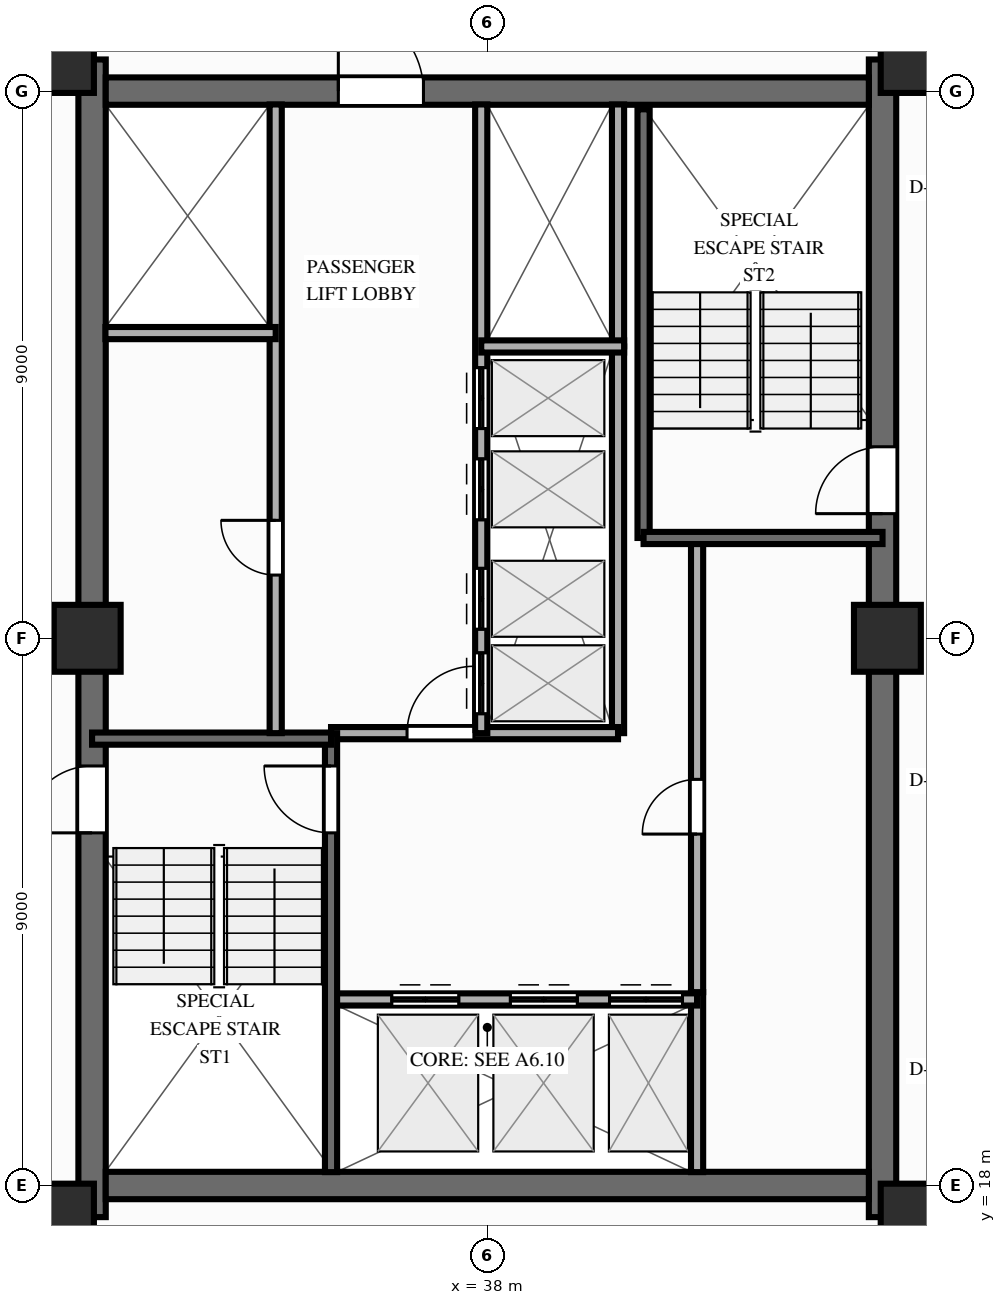
"""IFC4 building model, lengths in metres.
Left out: names, types, materials, properties, quantities, classifications, styles, units other than length and angle.
Written with IfcOpenShell. Run it as: python <this file> out.ifc"""

import sys

from ifc_helpers import new_model, si_unit, direction, frame, frame_2d, origin, origin_2d, place, context, subcontext, project, spatial, rectangle, extrude, source, transform, mapped, element, fill, save


model = new_model("IFC4")
c1 = context("Model", 3, precision=1e-05, world=origin(), true_north=direction((0.0, 1.0)))
c2 = subcontext(c1, "Body", "Model", "MODEL_VIEW")
j1 = project(units=[si_unit("LENGTHUNIT", "METRE"), si_unit("PLANEANGLEUNIT", "RADIAN")], contexts=[c1])
p1 = place(None, origin())
s1 = spatial("IfcSite", under=j1, at=p1, CompositionType="ELEMENT")
p2 = place(p1, origin())
s2 = spatial("IfcBuilding", under=s1, at=p2, CompositionType="ELEMENT")
p3 = place(p2, frame((0.0, 0.0, 166.0)))
s3 = spatial("IfcBuildingStorey", under=s2, at=p3, CompositionType="ELEMENT", Elevation=166.0)
p4 = place(p3, frame((31.5, 17.48, 0.0), z_axis=(0.0, 0.0, 1.0), x_axis=(0.0, 1.0, 0.0)))
e1 = element("IfcWall", 1, at=p4, inside=s3, PredefinedType="SHEAR", context=c2, shape_type="SweptSolid", body=[
    extrude(rectangle(XDim=19.04, YDim=0.45, at=frame_2d((9.52, 0.0))), origin(), (0.0, 0.0, 1.0), 3.0),
])
p5 = place(p4, frame((6.32, 0.0, 0.0)))
e2 = element("IfcOpeningElement", 2, at=p5, cuts=e1, PredefinedType="OPENING", context=c2, shape_type="SweptSolid", body=[
    extrude(rectangle(XDim=1.1, YDim=2.15, at=frame_2d((0.55, 1.075))), frame((0.0, 0.237, 0.0), z_axis=(0.0, -1.0, 0.0), x_axis=(1.0, 0.0, 0.0)), (0.0, 0.0, 1.0), 0.474),
])
p6 = place(p3, frame((44.5, 17.48, 0.0), z_axis=(0.0, 0.0, 1.0), x_axis=(0.0, 1.0, 0.0)))
e3 = element("IfcWall", 3, at=p6, inside=s3, PredefinedType="SHEAR", context=c2, shape_type="SweptSolid", body=[
    extrude(rectangle(XDim=19.04, YDim=0.45, at=frame_2d((9.52, 0.0))), origin(), (0.0, 0.0, 1.0), 3.0),
])
p7 = place(p6, frame((12.67, 0.0, 0.0), z_axis=(0.0, 0.0, 1.0), x_axis=(-1.0, 0.0, 0.0)))
e4 = element("IfcOpeningElement", 4, at=p7, cuts=e3, PredefinedType="OPENING", context=c2, shape_type="SweptSolid", body=[
    extrude(rectangle(XDim=1.1, YDim=2.15, at=frame_2d((0.55, 1.075))), frame((0.0, 0.237, 0.0), z_axis=(0.0, -1.0, 0.0), x_axis=(1.0, 0.0, 0.0)), (0.0, 0.0, 1.0), 0.474),
])
p8 = place(p3, frame((31.725, 18.0, 0.0), z_axis=(0.0, 0.0, 1.0), x_axis=(1.0, 0.0, 0.0)))
e5 = element("IfcWall", 5, at=p8, inside=s3, PredefinedType="SHEAR", context=c2, shape_type="SweptSolid", body=[
    extrude(rectangle(XDim=12.55, YDim=0.45, at=frame_2d((6.275, 0.0))), origin(), (0.0, 0.0, 1.0), 3.0),
])
p9 = place(p3, frame((31.725, 36.0, 0.0), z_axis=(0.0, 0.0, 1.0), x_axis=(1.0, 0.0, 0.0)))
e6 = element("IfcWall", 6, at=p9, inside=s3, PredefinedType="SHEAR", context=c2, shape_type="SweptSolid", body=[
    extrude(rectangle(XDim=12.55, YDim=0.45, at=frame_2d((6.275, 0.0))), origin(), (0.0, 0.0, 1.0), 3.0),
])
p10 = place(p9, frame((5.225, 0.0, 0.0), z_axis=(0.0, 0.0, 1.0), x_axis=(-1.0, 0.0, 0.0)))
e7 = element("IfcOpeningElement", 7, at=p10, cuts=e6, PredefinedType="OPENING", context=c2, shape_type="SweptSolid", body=[
    extrude(rectangle(XDim=1.4, YDim=2.15, at=frame_2d((0.7, 1.075))), frame((0.0, 0.237, 0.0), z_axis=(0.0, -1.0, 0.0), x_axis=(1.0, 0.0, 0.0)), (0.0, 0.0, 1.0), 0.474),
])
m1 = source(origin(), c2, "Body", "SweptSolid", [
    extrude(rectangle(XDim=1.1, YDim=1.1, at=origin_2d()), origin(), (0.0, 0.0, 1.0), 3.0),
])
for number, where, z_axis, x_axis in (
    (8, (30.98, 17.48, 0.0), (0.0, 0.0, 1.0), (1.0, 0.0, 0.0)),
    (9, (45.02, 17.48, 0.0), (0.0, 0.0, 1.0), (1.0, 0.0, 0.0)),
    (10, (30.98, 36.52, 0.0), (0.0, 0.0, 1.0), (1.0, 0.0, 0.0)),
    (11, (45.02, 36.52, 0.0), (0.0, 0.0, 1.0), (1.0, 0.0, 0.0)),
    (12, (31.42, 27.0, 0.0), (0.0, 0.0, 1.0), (1.0, 0.0, 0.0)),
    (13, (44.58, 27.0, 0.0), (0.0, 0.0, 1.0), (1.0, 0.0, 0.0)),
):
    element("IfcColumn", number, at=place(p3, frame(where, z_axis=z_axis, x_axis=x_axis)), inside=s3, PredefinedType="COLUMN", context=c2, shape_type="MappedRepresentation", body=[
        mapped(m1, transform((0.0, 0.0, 0.0), scale=1.0)),
    ])
p11 = place(p3, frame((41.45, 18.22, 0.0), z_axis=(0.0, 0.0, 1.0), x_axis=(0.0, 1.0, 0.0)))
e14 = element("IfcWall", 14, at=p11, inside=s3, PredefinedType="PARTITIONING", context=c2, shape_type="SweptSolid", body=[
    extrude(rectangle(XDim=2.96, YDim=0.2, at=frame_2d((1.48, 0.0))), origin(), (0.0, 0.0, 1.0), 2.79),
])
p12 = place(p3, frame((41.45, 21.18, 0.0), z_axis=(0.0, 0.0, 1.0), x_axis=(0.0, 1.0, 0.0)))
e15 = element("IfcWall", 15, at=p12, inside=s3, PredefinedType="PARTITIONING", context=c2, shape_type="SweptSolid", body=[
    extrude(rectangle(XDim=7.42, YDim=0.2, at=frame_2d((3.71, 0.0))), origin(), (0.0, 0.0, 1.0), 2.79),
])
p13 = place(p12, frame((2.6, 0.0, 0.0)))
e16 = element("IfcOpeningElement", 16, at=p13, cuts=e15, PredefinedType="OPENING", context=c2, shape_type="SweptSolid", body=[
    extrude(rectangle(XDim=0.9, YDim=2.1, at=frame_2d((0.45, 1.05))), frame((0.0, 0.112, 0.0), z_axis=(0.0, -1.0, 0.0), x_axis=(1.0, 0.0, 0.0)), (0.0, 0.0, 1.0), 0.224),
])
p14 = place(p3, frame((40.15, 25.44, 0.0), z_axis=(0.0, 0.0, 1.0), x_axis=(0.0, 1.0, 0.0)))
e17 = element("IfcWall", 17, at=p14, inside=s3, PredefinedType="PARTITIONING", context=c2, shape_type="SweptSolid", body=[
    extrude(rectangle(XDim=6.36, YDim=0.2, at=frame_2d((3.18, 0.0))), origin(), (0.0, 0.0, 1.0), 2.79),
])
p15 = place(p3, frame((40.15, 31.8, 0.0), z_axis=(0.0, 0.0, 1.0), x_axis=(0.0, 1.0, 0.0)))
e18 = element("IfcWall", 18, at=p15, inside=s3, PredefinedType="PARTITIONING", context=c2, shape_type="SweptSolid", body=[
    extrude(rectangle(XDim=3.98, YDim=0.2, at=frame_2d((1.99, 0.0))), origin(), (0.0, 0.0, 1.0), 2.79),
])
p16 = place(p3, frame((35.43, 21.06, 0.0), z_axis=(0.0, 0.0, 1.0), x_axis=(1.0, 0.0, 0.0)))
e19 = element("IfcWall", 19, at=p16, inside=s3, PredefinedType="PARTITIONING", context=c2, shape_type="SweptSolid", body=[
    extrude(rectangle(XDim=6.02, YDim=0.2, at=frame_2d((3.01, 0.0))), origin(), (0.0, 0.0, 1.0), 2.79),
])
p17 = place(p16, frame((1.0, 0.0, 0.0)))
e20 = element("IfcOpeningElement", 20, at=p17, cuts=e19, PredefinedType="OPENING", context=c2, shape_type="SweptSolid", body=[
    extrude(rectangle(XDim=1.1, YDim=2.15, at=frame_2d((0.55, 1.075))), frame((0.0, 0.112, 0.0), z_axis=(0.0, -1.0, 0.0), x_axis=(1.0, 0.0, 0.0)), (0.0, 0.0, 1.0), 0.224),
])
p18 = place(p16, frame((2.95, 0.0, 0.0)))
e21 = element("IfcOpeningElement", 21, at=p18, cuts=e19, PredefinedType="OPENING", context=c2, shape_type="SweptSolid", body=[
    extrude(rectangle(XDim=1.1, YDim=2.15, at=frame_2d((0.55, 1.075))), frame((0.0, 0.112, 0.0), z_axis=(0.0, -1.0, 0.0), x_axis=(1.0, 0.0, 0.0)), (0.0, 0.0, 1.0), 0.224),
])
p19 = place(p16, frame((4.58, 0.0, 0.0)))
e22 = element("IfcOpeningElement", 22, at=p19, cuts=e19, PredefinedType="OPENING", context=c2, shape_type="SweptSolid", body=[
    extrude(rectangle(XDim=1.2, YDim=2.15, at=frame_2d((0.6, 1.075))), frame((0.0, 0.112, 0.0), z_axis=(0.0, -1.0, 0.0), x_axis=(1.0, 0.0, 0.0)), (0.0, 0.0, 1.0), 0.224),
])
p20 = place(p3, frame((35.43, 25.44, 0.0), z_axis=(0.0, 0.0, 1.0), x_axis=(1.0, 0.0, 0.0)))
e23 = element("IfcWall", 23, at=p20, inside=s3, PredefinedType="PARTITIONING", context=c2, shape_type="SweptSolid", body=[
    extrude(rectangle(XDim=4.72, YDim=0.2, at=frame_2d((2.36, 0.0))), origin(), (0.0, 0.0, 1.0), 2.79),
])
p21 = place(p20, frame((1.25, 0.0, 0.0)))
e24 = element("IfcOpeningElement", 24, at=p21, cuts=e23, PredefinedType="OPENING", context=c2, shape_type="SweptSolid", body=[
    extrude(rectangle(XDim=1.1, YDim=2.15, at=frame_2d((0.55, 1.075))), frame((0.0, 0.112, 0.0), z_axis=(0.0, -1.0, 0.0), x_axis=(1.0, 0.0, 0.0)), (0.0, 0.0, 1.0), 0.224),
])
p22 = place(p3, frame((35.43, 18.22, 0.0), z_axis=(0.0, 0.0, 1.0), x_axis=(0.0, 1.0, 0.0)))
e25 = element("IfcWall", 25, at=p22, inside=s3, PredefinedType="SOLIDWALL", context=c2, shape_type="SweptSolid", body=[
    extrude(rectangle(XDim=7.22, YDim=0.2, at=frame_2d((3.61, 0.0))), origin(), (0.0, 0.0, 1.0), 2.79),
])
p23 = place(p22, frame((6.68, 0.0, 0.0), z_axis=(0.0, 0.0, 1.0), x_axis=(-1.0, 0.0, 0.0)))
e26 = element("IfcOpeningElement", 26, at=p23, cuts=e25, PredefinedType="OPENING", context=c2, shape_type="SweptSolid", body=[
    extrude(rectangle(XDim=1.1, YDim=2.15, at=frame_2d((0.55, 1.075))), frame((0.0, 0.112, 0.0), z_axis=(0.0, -1.0, 0.0), x_axis=(1.0, 0.0, 0.0)), (0.0, 0.0, 1.0), 0.224),
])
p24 = place(p3, frame((31.5, 25.35, 0.0), z_axis=(0.0, 0.0, 1.0), x_axis=(1.0, 0.0, 0.0)))
e27 = element("IfcWall", 27, at=p24, inside=s3, PredefinedType="SOLIDWALL", context=c2, shape_type="SweptSolid", body=[
    extrude(rectangle(XDim=3.93, YDim=0.2, at=frame_2d((1.965, 0.0))), origin(), (0.0, 0.0, 1.0), 2.79),
])
p25 = place(p3, frame((40.57, 28.65, 0.0), z_axis=(0.0, 0.0, 1.0), x_axis=(0.0, 1.0, 0.0)))
e28 = element("IfcWall", 28, at=p25, inside=s3, PredefinedType="SOLIDWALL", context=c2, shape_type="SweptSolid", body=[
    extrude(rectangle(XDim=7.05, YDim=0.2, at=frame_2d((3.525, 0.0))), origin(), (0.0, 0.0, 1.0), 2.79),
])
p26 = place(p3, frame((40.57, 28.65, 0.0), z_axis=(0.0, 0.0, 1.0), x_axis=(1.0, 0.0, 0.0)))
e29 = element("IfcWall", 29, at=p26, inside=s3, PredefinedType="SOLIDWALL", context=c2, shape_type="SweptSolid", body=[
    extrude(rectangle(XDim=3.93, YDim=0.2, at=frame_2d((1.965, 0.0))), origin(), (0.0, 0.0, 1.0), 2.79),
])
p27 = place(p3, frame((34.52, 25.44, 0.0), z_axis=(0.0, 0.0, 1.0), x_axis=(0.0, 1.0, 0.0)))
e30 = element("IfcWall", 30, at=p27, inside=s3, PredefinedType="PARTITIONING", context=c2, shape_type="SweptSolid", body=[
    extrude(rectangle(XDim=10.34, YDim=0.2, at=frame_2d((5.17, 0.0))), origin(), (0.0, 0.0, 1.0), 2.79),
])
p28 = place(p27, frame((2.6, 0.0, 0.0)))
e31 = element("IfcOpeningElement", 31, at=p28, cuts=e30, PredefinedType="OPENING", context=c2, shape_type="SweptSolid", body=[
    extrude(rectangle(XDim=0.9, YDim=2.1, at=frame_2d((0.45, 1.05))), frame((0.0, 0.112, 0.0), z_axis=(0.0, -1.0, 0.0), x_axis=(1.0, 0.0, 0.0)), (0.0, 0.0, 1.0), 0.224),
])
p29 = place(p3, frame((31.72, 32.02, 0.0), z_axis=(0.0, 0.0, 1.0), x_axis=(1.0, 0.0, 0.0)))
e32 = element("IfcWall", 32, at=p29, inside=s3, PredefinedType="PARTITIONING", context=c2, shape_type="SweptSolid", body=[
    extrude(rectangle(XDim=2.8, YDim=0.2, at=frame_2d((1.4, 0.0))), origin(), (0.0, 0.0, 1.0), 2.79),
])
p30 = place(p3, frame((37.9, 25.44, 0.0), z_axis=(0.0, 0.0, 1.0), x_axis=(0.0, 1.0, 0.0)))
e33 = element("IfcWall", 33, at=p30, inside=s3, PredefinedType="PARTITIONING", context=c2, shape_type="SweptSolid", body=[
    extrude(rectangle(XDim=10.34, YDim=0.2, at=frame_2d((5.17, 0.0))), origin(), (0.0, 0.0, 1.0), 2.79),
])
p31 = place(p30, frame((0.32, 0.0, 0.0)))
e34 = element("IfcOpeningElement", 34, at=p31, cuts=e33, PredefinedType="OPENING", context=c2, shape_type="SweptSolid", body=[
    extrude(rectangle(XDim=1.0, YDim=2.15, at=frame_2d((0.5, 1.075))), frame((0.0, 0.112, 0.0), z_axis=(0.0, -1.0, 0.0), x_axis=(1.0, 0.0, 0.0)), (0.0, 0.0, 1.0), 0.224),
])
p32 = place(p30, frame((1.71, 0.0, 0.0)))
e35 = element("IfcOpeningElement", 35, at=p32, cuts=e33, PredefinedType="OPENING", context=c2, shape_type="SweptSolid", body=[
    extrude(rectangle(XDim=1.0, YDim=2.15, at=frame_2d((0.5, 1.075))), frame((0.0, 0.112, 0.0), z_axis=(0.0, -1.0, 0.0), x_axis=(1.0, 0.0, 0.0)), (0.0, 0.0, 1.0), 0.224),
])
p33 = place(p30, frame((3.51, 0.0, 0.0)))
e36 = element("IfcOpeningElement", 36, at=p33, cuts=e33, PredefinedType="OPENING", context=c2, shape_type="SweptSolid", body=[
    extrude(rectangle(XDim=1.0, YDim=2.15, at=frame_2d((0.5, 1.075))), frame((0.0, 0.112, 0.0), z_axis=(0.0, -1.0, 0.0), x_axis=(1.0, 0.0, 0.0)), (0.0, 0.0, 1.0), 0.224),
])
p34 = place(p30, frame((5.01, 0.0, 0.0)))
e37 = element("IfcOpeningElement", 37, at=p34, cuts=e33, PredefinedType="OPENING", context=c2, shape_type="SweptSolid", body=[
    extrude(rectangle(XDim=1.0, YDim=2.15, at=frame_2d((0.5, 1.075))), frame((0.0, 0.112, 0.0), z_axis=(0.0, -1.0, 0.0), x_axis=(1.0, 0.0, 0.0)), (0.0, 0.0, 1.0), 0.224),
])
p35 = place(p3, frame((37.9, 31.8, 0.0), z_axis=(0.0, 0.0, 1.0), x_axis=(1.0, 0.0, 0.0)))
e38 = element("IfcWall", 38, at=p35, inside=s3, PredefinedType="PARTITIONING", context=c2, shape_type="SweptSolid", body=[
    extrude(rectangle(XDim=2.35, YDim=0.2, at=frame_2d((1.175, 0.0))), origin(), (0.0, 0.0, 1.0), 2.79),
])
m2 = source(origin(), c2, "Body", "SweptSolid", [
    extrude(rectangle(XDim=1.1, YDim=2.15, at=frame_2d((0.55, 1.075))), frame((0.0, 0.025, 0.0), z_axis=(0.0, -1.0, 0.0), x_axis=(1.0, 0.0, 0.0)), (0.0, 0.0, 1.0), 0.05),
])
p36 = place(p5, origin())
e39 = element("IfcDoor", 39, at=p36, inside=s3, OperationType="SINGLE_SWING_LEFT", PredefinedType="DOOR", context=c2, shape_type="MappedRepresentation", body=[
    mapped(m2, transform((0.0, 0.0, 0.0), scale=1.0)),
])
fill(e2, e39)
p37 = place(p7, origin())
e40 = element("IfcDoor", 40, at=p37, inside=s3, OperationType="SINGLE_SWING_RIGHT", PredefinedType="DOOR", context=c2, shape_type="MappedRepresentation", body=[
    mapped(m2, transform((0.0, 0.0, 0.0), scale=1.0)),
])
fill(e4, e40)
m3 = source(origin(), c2, "Body", "SweptSolid", [
    extrude(rectangle(XDim=1.4, YDim=2.15, at=frame_2d((0.7, 1.075))), frame((0.0, 0.025, 0.0), z_axis=(0.0, -1.0, 0.0), x_axis=(1.0, 0.0, 0.0)), (0.0, 0.0, 1.0), 0.05),
])
p38 = place(p10, origin())
e41 = element("IfcDoor", 41, at=p38, inside=s3, OperationType="SINGLE_SWING_RIGHT", PredefinedType="DOOR", context=c2, shape_type="MappedRepresentation", body=[
    mapped(m3, transform((0.0, 0.0, 0.0), scale=1.0)),
])
fill(e7, e41)
m4 = source(origin(), c2, "Body", "SweptSolid", [
    extrude(rectangle(XDim=0.9, YDim=2.1, at=frame_2d((0.45, 1.05))), frame((0.0, 0.025, 0.0), z_axis=(0.0, -1.0, 0.0), x_axis=(1.0, 0.0, 0.0)), (0.0, 0.0, 1.0), 0.05),
])
p39 = place(p13, origin())
e42 = element("IfcDoor", 42, at=p39, inside=s3, OperationType="SINGLE_SWING_LEFT", PredefinedType="DOOR", context=c2, shape_type="MappedRepresentation", body=[
    mapped(m4, transform((0.0, 0.0, 0.0), scale=1.0)),
])
fill(e16, e42)
p40 = place(p17, origin())
e43 = element("IfcDoor", 43, at=p40, inside=s3, OperationType="DOUBLE_DOOR_SLIDING", PredefinedType="DOOR", context=c2, shape_type="MappedRepresentation", body=[
    mapped(m2, transform((0.0, 0.0, 0.0), scale=1.0)),
])
fill(e20, e43)
p41 = place(p18, origin())
e44 = element("IfcDoor", 44, at=p41, inside=s3, OperationType="DOUBLE_DOOR_SLIDING", PredefinedType="DOOR", context=c2, shape_type="MappedRepresentation", body=[
    mapped(m2, transform((0.0, 0.0, 0.0), scale=1.0)),
])
fill(e21, e44)
m5 = source(origin(), c2, "Body", "SweptSolid", [
    extrude(rectangle(XDim=1.2, YDim=2.15, at=frame_2d((0.6, 1.075))), frame((0.0, 0.025, 0.0), z_axis=(0.0, -1.0, 0.0), x_axis=(1.0, 0.0, 0.0)), (0.0, 0.0, 1.0), 0.05),
])
p42 = place(p19, origin())
e45 = element("IfcDoor", 45, at=p42, inside=s3, OperationType="DOUBLE_DOOR_SLIDING", PredefinedType="DOOR", context=c2, shape_type="MappedRepresentation", body=[
    mapped(m5, transform((0.0, 0.0, 0.0), scale=1.0)),
])
fill(e22, e45)
p43 = place(p21, origin())
e46 = element("IfcDoor", 46, at=p43, inside=s3, OperationType="SINGLE_SWING_RIGHT", PredefinedType="DOOR", context=c2, shape_type="MappedRepresentation", body=[
    mapped(m2, transform((0.0, 0.0, 0.0), scale=1.0)),
])
fill(e24, e46)
p44 = place(p23, origin())
e47 = element("IfcDoor", 47, at=p44, inside=s3, OperationType="SINGLE_SWING_LEFT", PredefinedType="DOOR", context=c2, shape_type="MappedRepresentation", body=[
    mapped(m2, transform((0.0, 0.0, 0.0), scale=1.0)),
])
fill(e26, e47)
p45 = place(p28, origin())
e48 = element("IfcDoor", 48, at=p45, inside=s3, OperationType="SINGLE_SWING_RIGHT", PredefinedType="DOOR", context=c2, shape_type="MappedRepresentation", body=[
    mapped(m4, transform((0.0, 0.0, 0.0), scale=1.0)),
])
fill(e31, e48)
m6 = source(origin(), c2, "Body", "SweptSolid", [
    extrude(rectangle(XDim=1.0, YDim=2.15, at=frame_2d((0.5, 1.075))), frame((0.0, 0.025, 0.0), z_axis=(0.0, -1.0, 0.0), x_axis=(1.0, 0.0, 0.0)), (0.0, 0.0, 1.0), 0.05),
])
p46 = place(p31, origin())
e49 = element("IfcDoor", 49, at=p46, inside=s3, OperationType="DOUBLE_DOOR_SLIDING", PredefinedType="DOOR", context=c2, shape_type="MappedRepresentation", body=[
    mapped(m6, transform((0.0, 0.0, 0.0), scale=1.0)),
])
fill(e34, e49)
p47 = place(p32, origin())
e50 = element("IfcDoor", 50, at=p47, inside=s3, OperationType="DOUBLE_DOOR_SLIDING", PredefinedType="DOOR", context=c2, shape_type="MappedRepresentation", body=[
    mapped(m6, transform((0.0, 0.0, 0.0), scale=1.0)),
])
fill(e35, e50)
p48 = place(p33, origin())
e51 = element("IfcDoor", 51, at=p48, inside=s3, OperationType="DOUBLE_DOOR_SLIDING", PredefinedType="DOOR", context=c2, shape_type="MappedRepresentation", body=[
    mapped(m6, transform((0.0, 0.0, 0.0), scale=1.0)),
])
fill(e36, e51)
p49 = place(p34, origin())
e52 = element("IfcDoor", 52, at=p49, inside=s3, OperationType="DOUBLE_DOOR_SLIDING", PredefinedType="DOOR", context=c2, shape_type="MappedRepresentation", body=[
    mapped(m6, transform((0.0, 0.0, 0.0), scale=1.0)),
])
fill(e37, e52)
save(model, sys.argv[1])
